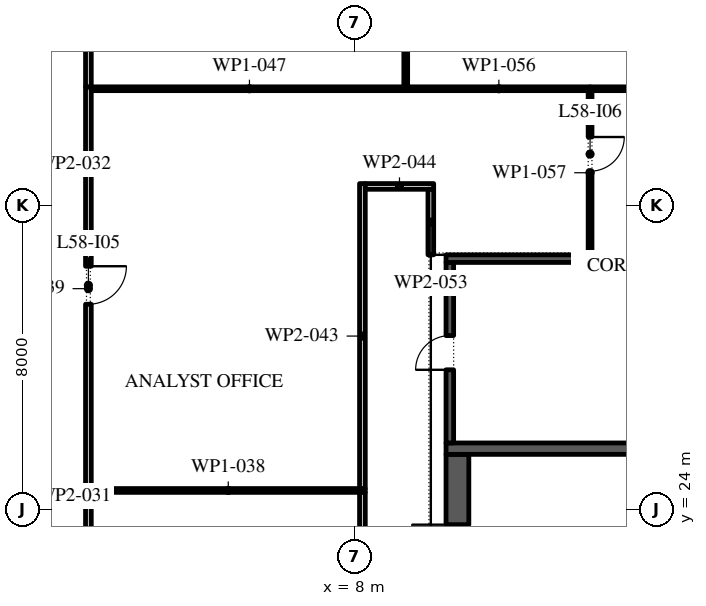
"""IFC4 building model, lengths in metres.
Left out: names, types, materials, properties, quantities, classifications, styles, units other than length and angle.
Written with IfcOpenShell. Run it as: python <this file> out.ifc"""

import sys

from ifc_helpers import new_model, si_unit, direction, frame, frame_2d, origin, place, context, subcontext, project, spatial, rectangle, extrude, element, fill, save


model = new_model("IFC4")
c1 = context("Model", 3, precision=1e-05, world=origin(), true_north=direction((0.0, 1.0)))
c2 = subcontext(c1, "Body", "Model", "MODEL_VIEW")
j1 = project(units=[si_unit("LENGTHUNIT", "METRE"), si_unit("PLANEANGLEUNIT", "RADIAN")], contexts=[c1])
p1 = place(None, origin())
s1 = spatial("IfcSite", under=j1, at=p1, CompositionType="ELEMENT")
p2 = place(p1, origin())
s2 = spatial("IfcBuilding", under=s1, at=p2, CompositionType="ELEMENT")
p3 = place(p2, frame((0.0, 0.0, 268.2)))
s3 = spatial("IfcBuildingStorey", under=s2, at=p3, CompositionType="ELEMENT", Elevation=268.2)
p4 = place(p3, frame((10.7, -2.45, 0.0), z_axis=(0.0, 0.0, 1.0), x_axis=(0.0, 1.0, 0.0)))
e1 = element("IfcWall", 1, at=p4, inside=s3, PredefinedType="SHEAR", context=c2, shape_type="SweptSolid", body=[
    extrude(rectangle(XDim=27.9, YDim=0.6, at=frame_2d((13.95, 0.0))), origin(), (0.0, 0.0, 1.0), 4.0),
])
p5 = place(p4, frame((23.65, 0.0, 0.0)))
e2 = element("IfcOpeningElement", 2, at=p5, cuts=e1, PredefinedType="OPENING", context=c2, shape_type="SweptSolid", body=[
    extrude(rectangle(XDim=2.4, YDim=2.1, at=frame_2d((1.2, 1.05))), frame((0.0, 0.31, 0.0), z_axis=(0.0, -1.0, 0.0), x_axis=(1.0, 0.0, 0.0)), (0.0, 0.0, 1.0), 0.62),
])
p6 = place(p4, frame((1.087, 0.0, 0.0)))
e3 = element("IfcOpeningElement", 3, at=p6, cuts=e1, PredefinedType="OPENING", context=c2, shape_type="SweptSolid", body=[
    extrude(rectangle(XDim=0.9, YDim=2.1, at=frame_2d((0.45, 1.05))), frame((0.0, 0.31, 0.0), z_axis=(0.0, -1.0, 0.0), x_axis=(1.0, 0.0, 0.0)), (0.0, 0.0, 1.0), 0.62),
])
p7 = place(p4, frame((4.262, 0.0, 0.0)))
e4 = element("IfcOpeningElement", 4, at=p7, cuts=e1, PredefinedType="OPENING", context=c2, shape_type="SweptSolid", body=[
    extrude(rectangle(XDim=1.0, YDim=2.1, at=frame_2d((0.5, 1.05))), frame((0.0, 0.31, 0.0), z_axis=(0.0, -1.0, 0.0), x_axis=(1.0, 0.0, 0.0)), (0.0, 0.0, 1.0), 0.62),
])
p8 = place(p3, frame((10.4, 25.6, 0.0), z_axis=(0.0, 0.0, 1.0), x_axis=(1.0, 0.0, 0.0)))
e5 = element("IfcWall", 5, at=p8, inside=s3, PredefinedType="SHEAR", context=c2, shape_type="SweptSolid", body=[
    extrude(rectangle(XDim=11.2, YDim=0.3, at=frame_2d((5.6, 0.0))), origin(), (0.0, 0.0, 1.0), 4.0),
])
p9 = place(p3, frame((10.5, 25.75, 0.0), z_axis=(0.0, 0.0, 1.0), x_axis=(0.0, 1.0, 0.0)))
e6 = element("IfcWall", 6, at=p9, inside=s3, PredefinedType="SHEAR", context=c2, shape_type="SweptSolid", body=[
    extrude(rectangle(XDim=4.75, YDim=0.2, at=frame_2d((2.375, 0.0))), origin(), (0.0, 0.0, 1.0), 4.0),
])
p10 = place(p9, frame((1.925, 0.0, 0.0)))
e7 = element("IfcOpeningElement", 7, at=p10, cuts=e6, PredefinedType="OPENING", context=c2, shape_type="SweptSolid", body=[
    extrude(rectangle(XDim=0.9, YDim=2.1, at=frame_2d((0.45, 1.05))), frame((0.0, 0.11, 0.0), z_axis=(0.0, -1.0, 0.0), x_axis=(1.0, 0.0, 0.0)), (0.0, 0.0, 1.0), 0.22),
])
p11 = place(p3, frame((10.4, 30.6, 0.0), z_axis=(0.0, 0.0, 1.0), x_axis=(1.0, 0.0, 0.0)))
e8 = element("IfcWall", 8, at=p11, inside=s3, PredefinedType="SHEAR", context=c2, shape_type="SweptSolid", body=[
    extrude(rectangle(XDim=11.2, YDim=0.2, at=frame_2d((5.6, 0.0))), origin(), (0.0, 0.0, 1.0), 4.0),
])
p12 = place(p3, frame((0.99, 24.5, 0.0), z_axis=(0.0, 0.0, 1.0), x_axis=(0.0, -1.0, 0.0)))
e9 = element("IfcWall", 9, at=p12, inside=s3, PredefinedType="PARTITIONING", context=c2, shape_type="SweptSolid", body=[
    extrude(rectangle(XDim=5.425, YDim=0.15, at=frame_2d((2.712, 0.0))), origin(), (0.0, 0.0, 1.0), 4.0),
])
p13 = place(p3, frame((1.065, 24.5, 0.0), z_axis=(0.0, 0.0, 1.0), x_axis=(1.0, 0.0, 0.0)))
e10 = element("IfcWall", 10, at=p13, inside=s3, PredefinedType="PARTITIONING", context=c2, shape_type="SweptSolid", body=[
    extrude(rectangle(XDim=7.21, YDim=0.1, at=frame_2d((3.605, 0.0))), origin(), (0.0, 0.0, 1.0), 4.0),
])
p14 = place(p3, frame((0.99, 35.12, 0.0), z_axis=(0.0, 0.0, 1.0), x_axis=(0.0, -1.0, 0.0)))
e11 = element("IfcWall", 11, at=p14, inside=s3, PredefinedType="PARTITIONING", context=c2, shape_type="SweptSolid", body=[
    extrude(rectangle(XDim=10.62, YDim=0.15, at=frame_2d((5.31, 0.0))), origin(), (0.0, 0.0, 1.0), 4.0),
])
p15 = place(p14, frame((4.72, 0.0, 0.0)))
e12 = element("IfcOpeningElement", 12, at=p15, cuts=e11, PredefinedType="OPENING", context=c2, shape_type="SweptSolid", body=[
    extrude(rectangle(XDim=1.0, YDim=2.1, at=frame_2d((0.5, 1.05))), frame((0.0, 0.085, 0.0), z_axis=(0.0, -1.0, 0.0), x_axis=(1.0, 0.0, 0.0)), (0.0, 0.0, 1.0), 0.17),
])
p16 = place(p3, frame((0.99, 41.55, 0.0), z_axis=(0.0, 0.0, 1.0), x_axis=(0.0, -1.0, 0.0)))
e13 = element("IfcWall", 13, at=p16, inside=s3, PredefinedType="PARTITIONING", context=c2, shape_type="SweptSolid", body=[
    extrude(rectangle(XDim=6.43, YDim=0.15, at=frame_2d((3.215, 0.0))), origin(), (0.0, 0.0, 1.0), 4.0),
])
p17 = place(p16, frame((4.08, 0.0, 0.0)))
e14 = element("IfcOpeningElement", 14, at=p17, cuts=e13, PredefinedType="OPENING", context=c2, shape_type="SweptSolid", body=[
    extrude(rectangle(XDim=1.0, YDim=2.1, at=frame_2d((0.5, 1.05))), frame((0.0, 0.085, 0.0), z_axis=(0.0, -1.0, 0.0), x_axis=(1.0, 0.0, 0.0)), (0.0, 0.0, 1.0), 0.17),
])
p18 = place(p3, frame((8.2, 19.075, 0.0), z_axis=(0.0, 0.0, 1.0), x_axis=(0.0, 1.0, 0.0)))
e15 = element("IfcWall", 15, at=p18, inside=s3, PredefinedType="PARTITIONING", context=c2, shape_type="SweptSolid", body=[
    extrude(rectangle(XDim=5.375, YDim=0.15, at=frame_2d((2.688, 0.0))), origin(), (0.0, 0.0, 1.0), 4.0),
])
p19 = place(p3, frame((8.2, 24.55, 0.0), z_axis=(0.0, 0.0, 1.0), x_axis=(0.0, 1.0, 0.0)))
e16 = element("IfcWall", 16, at=p19, inside=s3, PredefinedType="PARTITIONING", context=c2, shape_type="SweptSolid", body=[
    extrude(rectangle(XDim=8.025, YDim=0.15, at=frame_2d((4.012, 0.0))), origin(), (0.0, 0.0, 1.0), 4.0),
])
p20 = place(p3, frame((8.275, 32.5, 0.0), z_axis=(0.0, 0.0, 1.0), x_axis=(1.0, 0.0, 0.0)))
e17 = element("IfcWall", 17, at=p20, inside=s3, PredefinedType="PARTITIONING", context=c2, shape_type="SweptSolid", body=[
    extrude(rectangle(XDim=1.8, YDim=0.15, at=frame_2d((0.9, 0.0))), origin(), (0.0, 0.0, 1.0), 4.0),
])
p21 = place(p3, frame((9.39, 35.07, 0.0), z_axis=(0.0, 0.0, 1.0), x_axis=(-1.0, 0.0, 0.0)))
e18 = element("IfcWall", 18, at=p21, inside=s3, PredefinedType="PARTITIONING", context=c2, shape_type="SweptSolid", body=[
    extrude(rectangle(XDim=8.325, YDim=0.1, at=frame_2d((4.163, 0.0))), origin(), (0.0, 0.0, 1.0), 4.0),
])
p22 = place(p3, frame((9.34, 35.12, 0.0), z_axis=(0.0, 0.0, 1.0), x_axis=(0.0, 1.0, 0.0)))
e19 = element("IfcWall", 19, at=p22, inside=s3, PredefinedType="PARTITIONING", context=c2, shape_type="SweptSolid", body=[
    extrude(rectangle(XDim=6.43, YDim=0.1, at=frame_2d((3.215, 0.0))), origin(), (0.0, 0.0, 1.0), 4.0),
])
p23 = place(p22, frame((3.9, 0.0, 0.0)))
e20 = element("IfcOpeningElement", 20, at=p23, cuts=e19, PredefinedType="OPENING", context=c2, shape_type="SweptSolid", body=[
    extrude(rectangle(XDim=0.9, YDim=2.1, at=frame_2d((0.45, 1.05))), frame((0.0, 0.06, 0.0), z_axis=(0.0, -1.0, 0.0), x_axis=(1.0, 0.0, 0.0)), (0.0, 0.0, 1.0), 0.12),
])
p24 = place(p3, frame((10.0, 32.425, 0.0), z_axis=(0.0, 0.0, 1.0), x_axis=(0.0, -1.0, 0.0)))
e21 = element("IfcWall", 21, at=p24, inside=s3, PredefinedType="PARTITIONING", context=c2, shape_type="SweptSolid", body=[
    extrude(rectangle(XDim=1.725, YDim=0.15, at=frame_2d((0.863, 0.0))), origin(), (0.0, 0.0, 1.0), 4.0),
])
p25 = place(p3, frame((14.19, 35.07, 0.0), z_axis=(0.0, 0.0, 1.0), x_axis=(-1.0, 0.0, 0.0)))
e22 = element("IfcWall", 22, at=p25, inside=s3, PredefinedType="PARTITIONING", context=c2, shape_type="SweptSolid", body=[
    extrude(rectangle(XDim=4.8, YDim=0.1, at=frame_2d((2.4, 0.0))), origin(), (0.0, 0.0, 1.0), 4.0),
])
p26 = place(p3, frame((14.19, 35.02, 0.0), z_axis=(0.0, 0.0, 1.0), x_axis=(0.0, -1.0, 0.0)))
e23 = element("IfcWall", 23, at=p26, inside=s3, PredefinedType="PARTITIONING", context=c2, shape_type="SweptSolid", body=[
    extrude(rectangle(XDim=4.32, YDim=0.1, at=frame_2d((2.16, 0.0))), origin(), (0.0, 0.0, 1.0), 4.0),
])
p27 = place(p26, frame((1.22, 0.0, 0.0)))
e24 = element("IfcOpeningElement", 24, at=p27, cuts=e23, PredefinedType="OPENING", context=c2, shape_type="SweptSolid", body=[
    extrude(rectangle(XDim=0.9, YDim=2.1, at=frame_2d((0.45, 1.05))), frame((0.0, 0.06, 0.0), z_axis=(0.0, -1.0, 0.0), x_axis=(1.0, 0.0, 0.0)), (0.0, 0.0, 1.0), 0.12),
])
p28 = place(p3, frame((21.98, 35.07, 0.0), z_axis=(0.0, 0.0, 1.0), x_axis=(-1.0, 0.0, 0.0)))
e25 = element("IfcWall", 25, at=p28, inside=s3, PredefinedType="PARTITIONING", context=c2, shape_type="SweptSolid", body=[
    extrude(rectangle(XDim=7.79, YDim=0.1, at=frame_2d((3.895, 0.0))), origin(), (0.0, 0.0, 1.0), 4.0),
])
p29 = place(p5, origin())
e26 = element("IfcDoor", 26, at=p29, inside=s3, OperationType="DOUBLE_DOOR_SINGLE_SWING", PredefinedType="DOOR", context=c2, shape_type="SweptSolid", body=[
    extrude(rectangle(XDim=2.4, YDim=2.1, at=frame_2d((1.2, 1.05))), frame((0.0, 0.025, 0.0), z_axis=(0.0, -1.0, 0.0), x_axis=(1.0, 0.0, 0.0)), (0.0, 0.0, 1.0), 0.05),
])
fill(e2, e26)
p30 = place(p10, origin())
e27 = element("IfcDoor", 27, at=p30, inside=s3, OperationType="SINGLE_SWING_RIGHT", PredefinedType="DOOR", context=c2, shape_type="SweptSolid", body=[
    extrude(rectangle(XDim=0.9, YDim=2.1, at=frame_2d((0.45, 1.05))), frame((0.0, -0.05, 0.0), z_axis=(0.0, -1.0, 0.0), x_axis=(1.0, 0.0, 0.0)), (0.0, 0.0, 1.0), 0.05),
])
fill(e7, e27)
p31 = place(p15, origin())
e28 = element("IfcDoor", 28, at=p31, inside=s3, OperationType="SINGLE_SWING_RIGHT", PredefinedType="DOOR", context=c2, shape_type="SweptSolid", body=[
    extrude(rectangle(XDim=1.0, YDim=2.1, at=frame_2d((0.5, 1.05))), frame((0.0, 0.025, 0.0), z_axis=(0.0, -1.0, 0.0), x_axis=(1.0, 0.0, 0.0)), (0.0, 0.0, 1.0), 0.05),
])
fill(e12, e28)
p32 = place(p27, origin())
e29 = element("IfcDoor", 29, at=p32, inside=s3, OperationType="SINGLE_SWING_RIGHT", PredefinedType="DOOR", context=c2, shape_type="SweptSolid", body=[
    extrude(rectangle(XDim=0.9, YDim=2.1, at=frame_2d((0.45, 1.05))), frame((0.0, 0.025, 0.0), z_axis=(0.0, -1.0, 0.0), x_axis=(1.0, 0.0, 0.0)), (0.0, 0.0, 1.0), 0.05),
])
fill(e24, e29)
save(model, sys.argv[1])
